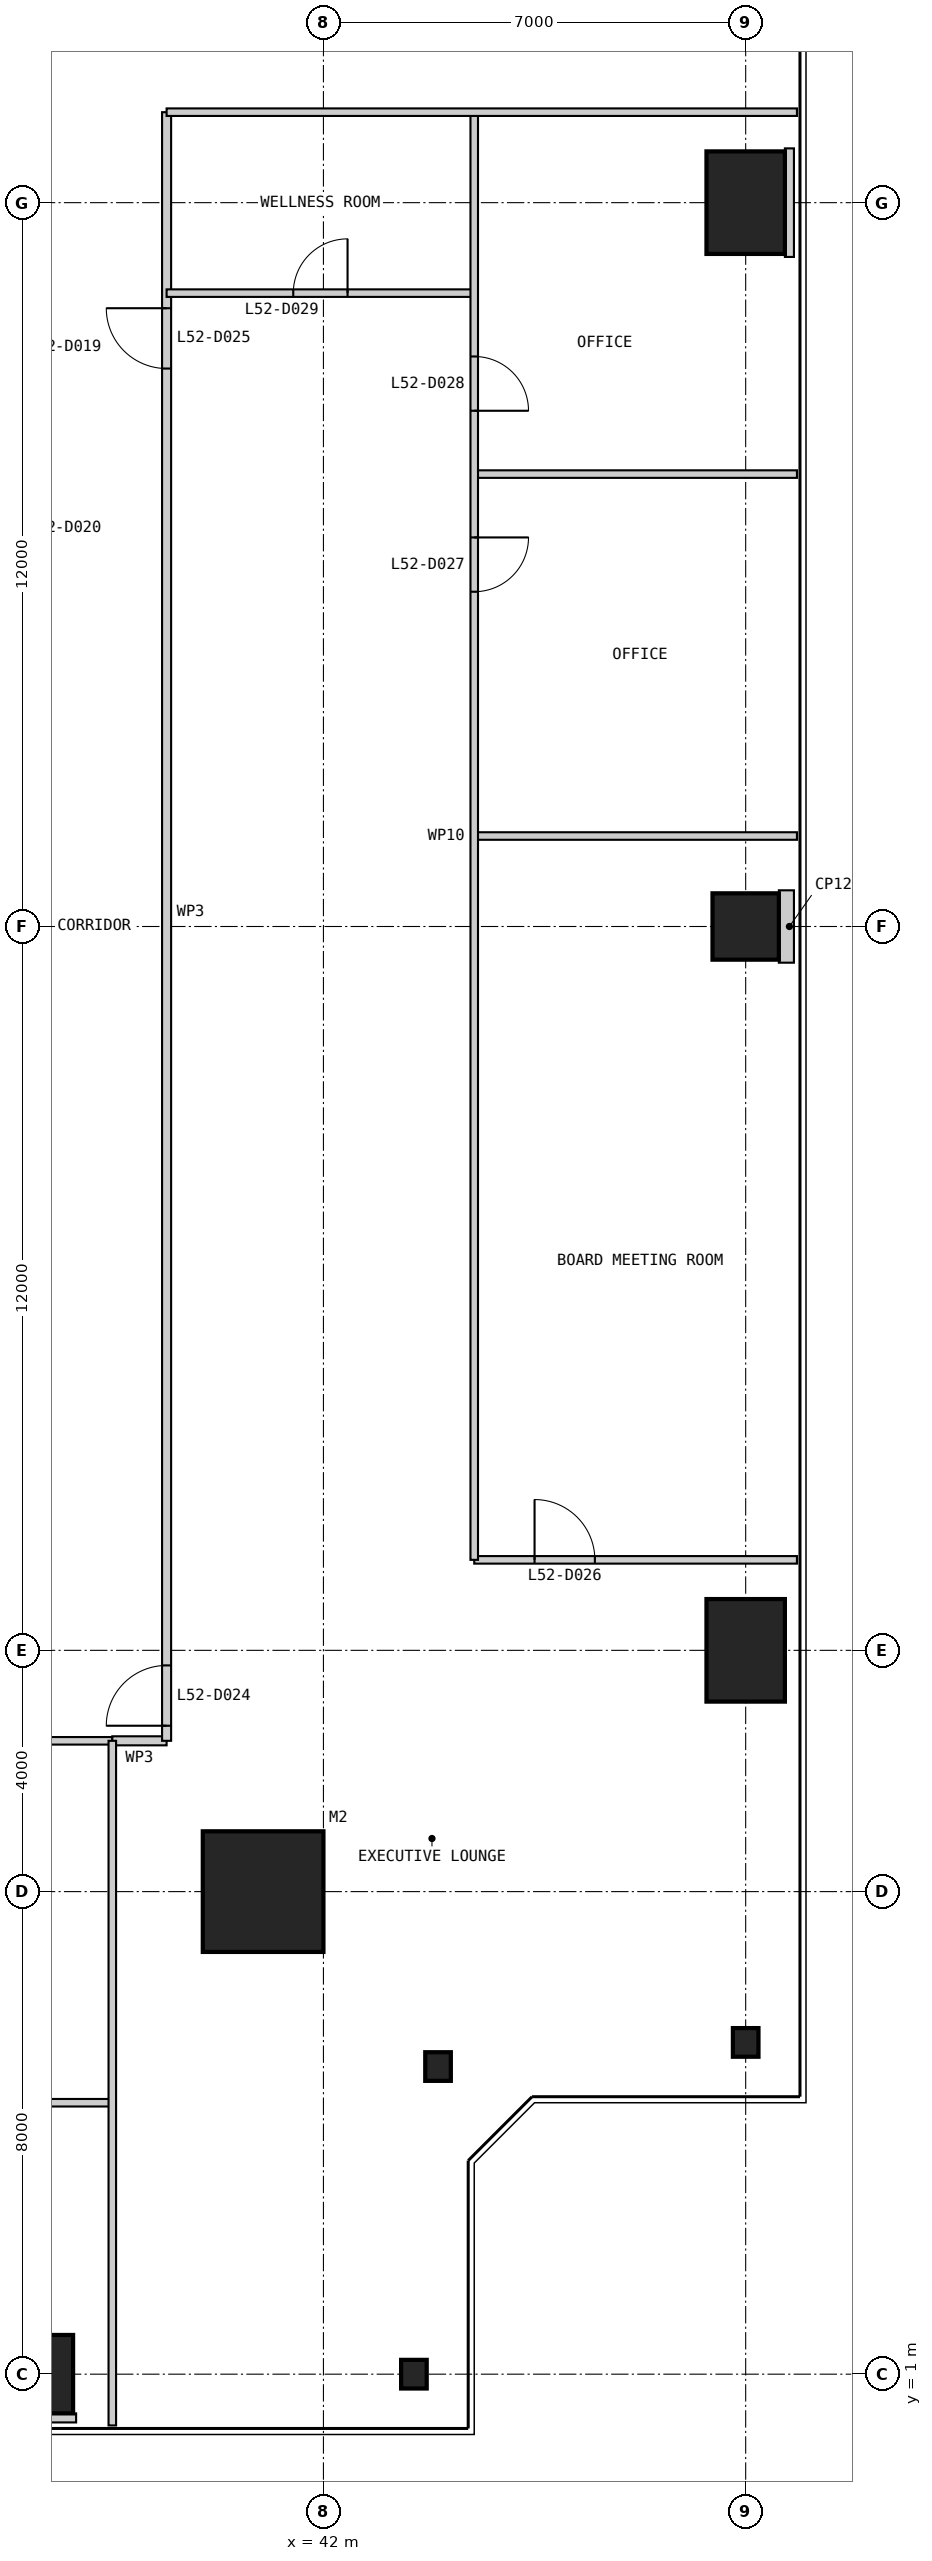
"""IFC4 building model, lengths in metres.
Left out: names, types, materials, properties, quantities, classifications, styles, units other than length and angle.
Written with IfcOpenShell. Run it as: python <this file> out.ifc"""

import sys

from ifc_helpers import new_model, si_unit, direction, frame, frame_2d, origin, origin_2d, place, context, subcontext, project, spatial, rectangle, i_section, extrude, element, fill, save


model = new_model("IFC4")
c1 = context("Model", 3, precision=1e-05, world=origin(), true_north=direction((0.0, 1.0)))
c2 = subcontext(c1, "Body", "Model", "MODEL_VIEW")
j1 = project(units=[si_unit("LENGTHUNIT", "METRE"), si_unit("PLANEANGLEUNIT", "RADIAN")], contexts=[c1])
p1 = place(None, origin())
s1 = spatial("IfcSite", under=j1, at=p1, CompositionType="ELEMENT")
p2 = place(p1, origin())
s2 = spatial("IfcBuilding", under=s1, at=p2, CompositionType="ELEMENT")
p3 = place(p2, frame((0.0, 0.0, 221.8)))
s3 = spatial("IfcBuildingStorey", under=s2, at=p3, CompositionType="ELEMENT", Elevation=221.8)
p4 = place(p3, frame((41.0, 9.0, 0.0), z_axis=(0.0, 0.0, 1.0), x_axis=(1.0, 0.0, 0.0)))
e1 = element("IfcColumn", 1, at=p4, inside=s3, PredefinedType="COLUMN", context=c2, shape_type="SweptSolid", body=[
    extrude(rectangle(XDim=2.0, YDim=2.0, at=origin_2d()), origin(), (0.0, 0.0, 1.0), 4.0),
])
p5 = place(p3, frame((37.0, 1.0, 0.0), z_axis=(0.0, 0.0, 1.0), x_axis=(1.0, 0.0, 0.0)))
e2 = element("IfcColumn", 2, at=p5, inside=s3, PredefinedType="COLUMN", context=c2, shape_type="SweptSolid", body=[
    extrude(rectangle(XDim=1.7, YDim=1.3, at=origin_2d()), origin(), (0.0, 0.0, 1.0), 4.0),
])
for number, where, z_axis, x_axis in (
    (3, (43.5, 1.0, 0.0), (0.0, 0.0, 1.0), (1.0, 0.0, 0.0)),
    (4, (43.9, 6.1, 0.0), (0.0, 0.0, 1.0), (1.0, 0.0, 0.0)),
    (5, (49.0, 6.5, 0.0), (0.0, 0.0, 1.0), (1.0, 0.0, 0.0)),
):
    element("IfcColumn", number, at=place(p3, frame(where, z_axis=z_axis, x_axis=x_axis)), inside=s3, PredefinedType="COLUMN", context=c2, shape_type="SweptSolid", body=[
        extrude(i_section(OverallWidth=0.424, OverallDepth=0.475, WebThickness=0.048, FlangeThickness=0.077, at=origin_2d()), origin(), (0.0, 0.0, 1.0), 4.0),
    ])
p6 = place(p3, frame((49.0, 13.0, 0.0), z_axis=(0.0, 0.0, 1.0), x_axis=(1.0, 0.0, 0.0)))
e6 = element("IfcColumn", 6, at=p6, inside=s3, PredefinedType="COLUMN", context=c2, shape_type="SweptSolid", body=[
    extrude(rectangle(XDim=1.3, YDim=1.7, at=origin_2d()), origin(), (0.0, 0.0, 1.0), 4.0),
])
p7 = place(p3, frame((49.0, 25.0, 0.0), z_axis=(0.0, 0.0, 1.0), x_axis=(1.0, 0.0, 0.0)))
e7 = element("IfcColumn", 7, at=p7, inside=s3, PredefinedType="COLUMN", context=c2, shape_type="SweptSolid", body=[
    extrude(rectangle(XDim=1.1, YDim=1.1, at=origin_2d()), origin(), (0.0, 0.0, 1.0), 4.0),
])
p8 = place(p3, frame((49.0, 37.0, 0.0), z_axis=(0.0, 0.0, 1.0), x_axis=(1.0, 0.0, 0.0)))
e8 = element("IfcColumn", 8, at=p8, inside=s3, PredefinedType="COLUMN", context=c2, shape_type="SweptSolid", body=[
    extrude(rectangle(XDim=1.3, YDim=1.7, at=origin_2d()), origin(), (0.0, 0.0, 1.0), 4.0),
])
p9 = place(p3, frame((32.5, 5.5, 0.0), z_axis=(0.0, 0.0, 1.0), x_axis=(1.0, 0.0, 0.0)))
e9 = element("IfcWall", 9, at=p9, inside=s3, PredefinedType="PARTITIONING", context=c2, shape_type="SweptSolid", body=[
    extrude(rectangle(XDim=6.0, YDim=0.125, at=frame_2d((3.0, 0.0))), origin(), (0.0, 0.0, 1.0), 3.85),
])
p10 = place(p3, frame((35.5, 11.5, 0.0), z_axis=(0.0, 0.0, 1.0), x_axis=(1.0, 0.0, 0.0)))
e10 = element("IfcWall", 10, at=p10, inside=s3, PredefinedType="PARTITIONING", context=c2, shape_type="SweptSolid", body=[
    extrude(rectangle(XDim=3.0, YDim=0.125, at=frame_2d((1.5, 0.0))), origin(), (0.0, 0.0, 1.0), 3.85),
])
p11 = place(p3, frame((38.5, 11.5, 0.0), z_axis=(0.0, 0.0, 1.0), x_axis=(1.0, 0.0, 0.0)))
e11 = element("IfcWall", 11, at=p11, inside=s3, PredefinedType="PARTITIONING", context=c2, shape_type="SweptSolid", body=[
    extrude(rectangle(XDim=0.9, YDim=0.15, at=frame_2d((0.45, 0.0))), origin(), (0.0, 0.0, 1.0), 3.85),
])
p12 = place(p3, frame((39.4, 11.5, 0.0), z_axis=(0.0, 0.0, 1.0), x_axis=(0.0, 1.0, 0.0)))
e12 = element("IfcWall", 12, at=p12, inside=s3, PredefinedType="PARTITIONING", context=c2, shape_type="SweptSolid", body=[
    extrude(rectangle(XDim=27.0, YDim=0.15, at=frame_2d((13.5, 0.0))), origin(), (0.0, 0.0, 1.0), 3.85),
])
p13 = place(p12, frame((0.25, 0.0, 0.0)))
e13 = element("IfcOpeningElement", 13, at=p13, cuts=e12, PredefinedType="OPENING", context=c2, shape_type="SweptSolid", body=[
    extrude(rectangle(XDim=1.0, YDim=2.2, at=frame_2d((0.5, 1.1))), frame((0.0, 0.085, 0.0), z_axis=(0.0, -1.0, 0.0), x_axis=(1.0, 0.0, 0.0)), (0.0, 0.0, 1.0), 0.17),
])
p14 = place(p12, frame((22.75, 0.0, 0.0)))
e14 = element("IfcOpeningElement", 14, at=p14, cuts=e12, PredefinedType="OPENING", context=c2, shape_type="SweptSolid", body=[
    extrude(rectangle(XDim=1.0, YDim=2.2, at=frame_2d((0.5, 1.1))), frame((0.0, 0.085, 0.0), z_axis=(0.0, -1.0, 0.0), x_axis=(1.0, 0.0, 0.0)), (0.0, 0.0, 1.0), 0.17),
])
p15 = place(p3, frame((38.5, 0.15, 0.0), z_axis=(0.0, 0.0, 1.0), x_axis=(0.0, 1.0, 0.0)))
e15 = element("IfcWall", 15, at=p15, inside=s3, PredefinedType="PARTITIONING", context=c2, shape_type="SweptSolid", body=[
    extrude(rectangle(XDim=11.35, YDim=0.125, at=frame_2d((5.675, 0.0))), origin(), (0.0, 0.0, 1.0), 3.85),
])
p16 = place(p3, frame((49.85, 14.5, 0.0), z_axis=(0.0, 0.0, 1.0), x_axis=(-1.0, 0.0, 0.0)))
e16 = element("IfcWall", 16, at=p16, inside=s3, PredefinedType="PARTITIONING", context=c2, shape_type="SweptSolid", body=[
    extrude(rectangle(XDim=5.35, YDim=0.125, at=frame_2d((2.675, 0.0))), origin(), (0.0, 0.0, 1.0), 3.85),
])
p17 = place(p16, frame((3.35, 0.0, 0.0)))
e17 = element("IfcOpeningElement", 17, at=p17, cuts=e16, PredefinedType="OPENING", context=c2, shape_type="SweptSolid", body=[
    extrude(rectangle(XDim=1.0, YDim=2.2, at=frame_2d((0.5, 1.1))), frame((0.0, 0.073, 0.0), z_axis=(0.0, -1.0, 0.0), x_axis=(1.0, 0.0, 0.0)), (0.0, 0.0, 1.0), 0.145),
])
for number, where, z_axis, x_axis in (
    (18, (49.85, 26.5, 0.0), (0.0, 0.0, 1.0), (-1.0, 0.0, 0.0)),
    (19, (49.85, 32.5, 0.0), (0.0, 0.0, 1.0), (-1.0, 0.0, 0.0)),
):
    element("IfcWall", number, at=place(p3, frame(where, z_axis=z_axis, x_axis=x_axis)), inside=s3, PredefinedType="PARTITIONING", context=c2, shape_type="SweptSolid", body=[
        extrude(rectangle(XDim=5.35, YDim=0.125, at=frame_2d((2.675, 0.0))), origin(), (0.0, 0.0, 1.0), 3.85),
    ])
p18 = place(p3, frame((44.5, 35.5, 0.0), z_axis=(0.0, 0.0, 1.0), x_axis=(-1.0, 0.0, 0.0)))
e20 = element("IfcWall", 20, at=p18, inside=s3, PredefinedType="PARTITIONING", context=c2, shape_type="SweptSolid", body=[
    extrude(rectangle(XDim=5.1, YDim=0.125, at=frame_2d((2.55, 0.0))), origin(), (0.0, 0.0, 1.0), 3.85),
])
p19 = place(p18, frame((2.1, 0.0, 0.0)))
e21 = element("IfcOpeningElement", 21, at=p19, cuts=e20, PredefinedType="OPENING", context=c2, shape_type="SweptSolid", body=[
    extrude(rectangle(XDim=0.9, YDim=2.2, at=frame_2d((0.45, 1.1))), frame((0.0, 0.073, 0.0), z_axis=(0.0, -1.0, 0.0), x_axis=(1.0, 0.0, 0.0)), (0.0, 0.0, 1.0), 0.145),
])
p20 = place(p3, frame((44.5, 14.5, 0.0), z_axis=(0.0, 0.0, 1.0), x_axis=(0.0, 1.0, 0.0)))
e22 = element("IfcWall", 22, at=p20, inside=s3, PredefinedType="PARTITIONING", context=c2, shape_type="SweptSolid", body=[
    extrude(rectangle(XDim=24.0, YDim=0.125, at=frame_2d((12.0, 0.0))), origin(), (0.0, 0.0, 1.0), 3.85),
])
p21 = place(p20, frame((16.05, 0.0, 0.0)))
e23 = element("IfcOpeningElement", 23, at=p21, cuts=e22, PredefinedType="OPENING", context=c2, shape_type="SweptSolid", body=[
    extrude(rectangle(XDim=0.9, YDim=2.2, at=frame_2d((0.45, 1.1))), frame((0.0, 0.073, 0.0), z_axis=(0.0, -1.0, 0.0), x_axis=(1.0, 0.0, 0.0)), (0.0, 0.0, 1.0), 0.145),
])
p22 = place(p20, frame((19.05, 0.0, 0.0)))
e24 = element("IfcOpeningElement", 24, at=p22, cuts=e22, PredefinedType="OPENING", context=c2, shape_type="SweptSolid", body=[
    extrude(rectangle(XDim=0.9, YDim=2.2, at=frame_2d((0.45, 1.1))), frame((0.0, 0.073, 0.0), z_axis=(0.0, -1.0, 0.0), x_axis=(1.0, 0.0, 0.0)), (0.0, 0.0, 1.0), 0.145),
])
p23 = place(p3, frame((49.85, 38.5, 0.0), z_axis=(0.0, 0.0, 1.0), x_axis=(-1.0, 0.0, 0.0)))
e25 = element("IfcWall", 25, at=p23, inside=s3, PredefinedType="PARTITIONING", context=c2, shape_type="SweptSolid", body=[
    extrude(rectangle(XDim=10.45, YDim=0.125, at=frame_2d((5.225, 0.0))), origin(), (0.0, 0.0, 1.0), 3.85),
])
p24 = place(p3, frame((37.0, 0.2, 0.0), z_axis=(0.0, 0.0, 1.0), x_axis=(0.0, 1.0, 0.0)))
e26 = element("IfcWall", 26, at=p24, inside=s3, PredefinedType="PARTITIONING", context=c2, shape_type="SweptSolid", body=[
    extrude(rectangle(XDim=0.15, YDim=1.8, at=frame_2d((0.075, 0.0))), origin(), (0.0, 0.0, 1.0), 3.85),
])
p25 = place(p3, frame((49.8, 25.0, 0.0), z_axis=(0.0, 0.0, 1.0), x_axis=(-1.0, 0.0, 0.0)))
e27 = element("IfcWall", 27, at=p25, inside=s3, PredefinedType="PARTITIONING", context=c2, shape_type="SweptSolid", body=[
    extrude(rectangle(XDim=0.25, YDim=1.2, at=frame_2d((0.125, 0.0))), origin(), (0.0, 0.0, 1.0), 3.85),
])
p26 = place(p3, frame((49.8, 37.0, 0.0), z_axis=(0.0, 0.0, 1.0), x_axis=(-1.0, 0.0, 0.0)))
e28 = element("IfcWall", 28, at=p26, inside=s3, PredefinedType="PARTITIONING", context=c2, shape_type="SweptSolid", body=[
    extrude(rectangle(XDim=0.15, YDim=1.8, at=frame_2d((0.075, 0.0))), origin(), (0.0, 0.0, 1.0), 3.85),
])
p27 = place(p13, origin())
e29 = element("IfcDoor", 29, at=p27, inside=s3, OperationType="SINGLE_SWING_LEFT", PredefinedType="DOOR", context=c2, shape_type="SweptSolid", body=[
    extrude(rectangle(XDim=1.0, YDim=2.2, at=frame_2d((0.5, 1.1))), frame((0.0, 0.025, 0.0), z_axis=(0.0, -1.0, 0.0), x_axis=(1.0, 0.0, 0.0)), (0.0, 0.0, 1.0), 0.05),
])
fill(e13, e29)
p28 = place(p14, origin())
e30 = element("IfcDoor", 30, at=p28, inside=s3, OperationType="SINGLE_SWING_RIGHT", PredefinedType="DOOR", context=c2, shape_type="SweptSolid", body=[
    extrude(rectangle(XDim=1.0, YDim=2.2, at=frame_2d((0.5, 1.1))), frame((0.0, 0.025, 0.0), z_axis=(0.0, -1.0, 0.0), x_axis=(1.0, 0.0, 0.0)), (0.0, 0.0, 1.0), 0.05),
])
fill(e14, e30)
p29 = place(p17, frame((1.0, 0.0, 0.0), z_axis=(0.0, 0.0, 1.0), x_axis=(-1.0, 0.0, 0.0)))
e31 = element("IfcDoor", 31, at=p29, inside=s3, OperationType="SINGLE_SWING_LEFT", PredefinedType="DOOR", context=c2, shape_type="SweptSolid", body=[
    extrude(rectangle(XDim=1.0, YDim=2.2, at=frame_2d((0.5, 1.1))), frame((0.0, 0.025, 0.0), z_axis=(0.0, -1.0, 0.0), x_axis=(1.0, 0.0, 0.0)), (0.0, 0.0, 1.0), 0.05),
])
fill(e17, e31)
p30 = place(p21, frame((0.9, 0.0, 0.0), z_axis=(0.0, 0.0, 1.0), x_axis=(-1.0, 0.0, 0.0)))
e32 = element("IfcDoor", 32, at=p30, inside=s3, OperationType="SINGLE_SWING_LEFT", PredefinedType="DOOR", context=c2, shape_type="SweptSolid", body=[
    extrude(rectangle(XDim=0.9, YDim=2.2, at=frame_2d((0.45, 1.1))), frame((0.0, 0.025, 0.0), z_axis=(0.0, -1.0, 0.0), x_axis=(1.0, 0.0, 0.0)), (0.0, 0.0, 1.0), 0.05),
])
fill(e23, e32)
p31 = place(p22, frame((0.9, 0.0, 0.0), z_axis=(0.0, 0.0, 1.0), x_axis=(-1.0, 0.0, 0.0)))
e33 = element("IfcDoor", 33, at=p31, inside=s3, OperationType="SINGLE_SWING_RIGHT", PredefinedType="DOOR", context=c2, shape_type="SweptSolid", body=[
    extrude(rectangle(XDim=0.9, YDim=2.2, at=frame_2d((0.45, 1.1))), frame((0.0, 0.025, 0.0), z_axis=(0.0, -1.0, 0.0), x_axis=(1.0, 0.0, 0.0)), (0.0, 0.0, 1.0), 0.05),
])
fill(e24, e33)
p32 = place(p19, frame((0.9, 0.0, 0.0), z_axis=(0.0, 0.0, 1.0), x_axis=(-1.0, 0.0, 0.0)))
e34 = element("IfcDoor", 34, at=p32, inside=s3, OperationType="SINGLE_SWING_RIGHT", PredefinedType="DOOR", context=c2, shape_type="SweptSolid", body=[
    extrude(rectangle(XDim=0.9, YDim=2.2, at=frame_2d((0.45, 1.1))), frame((0.0, 0.025, 0.0), z_axis=(0.0, -1.0, 0.0), x_axis=(1.0, 0.0, 0.0)), (0.0, 0.0, 1.0), 0.05),
])
fill(e21, e34)
save(model, sys.argv[1])
